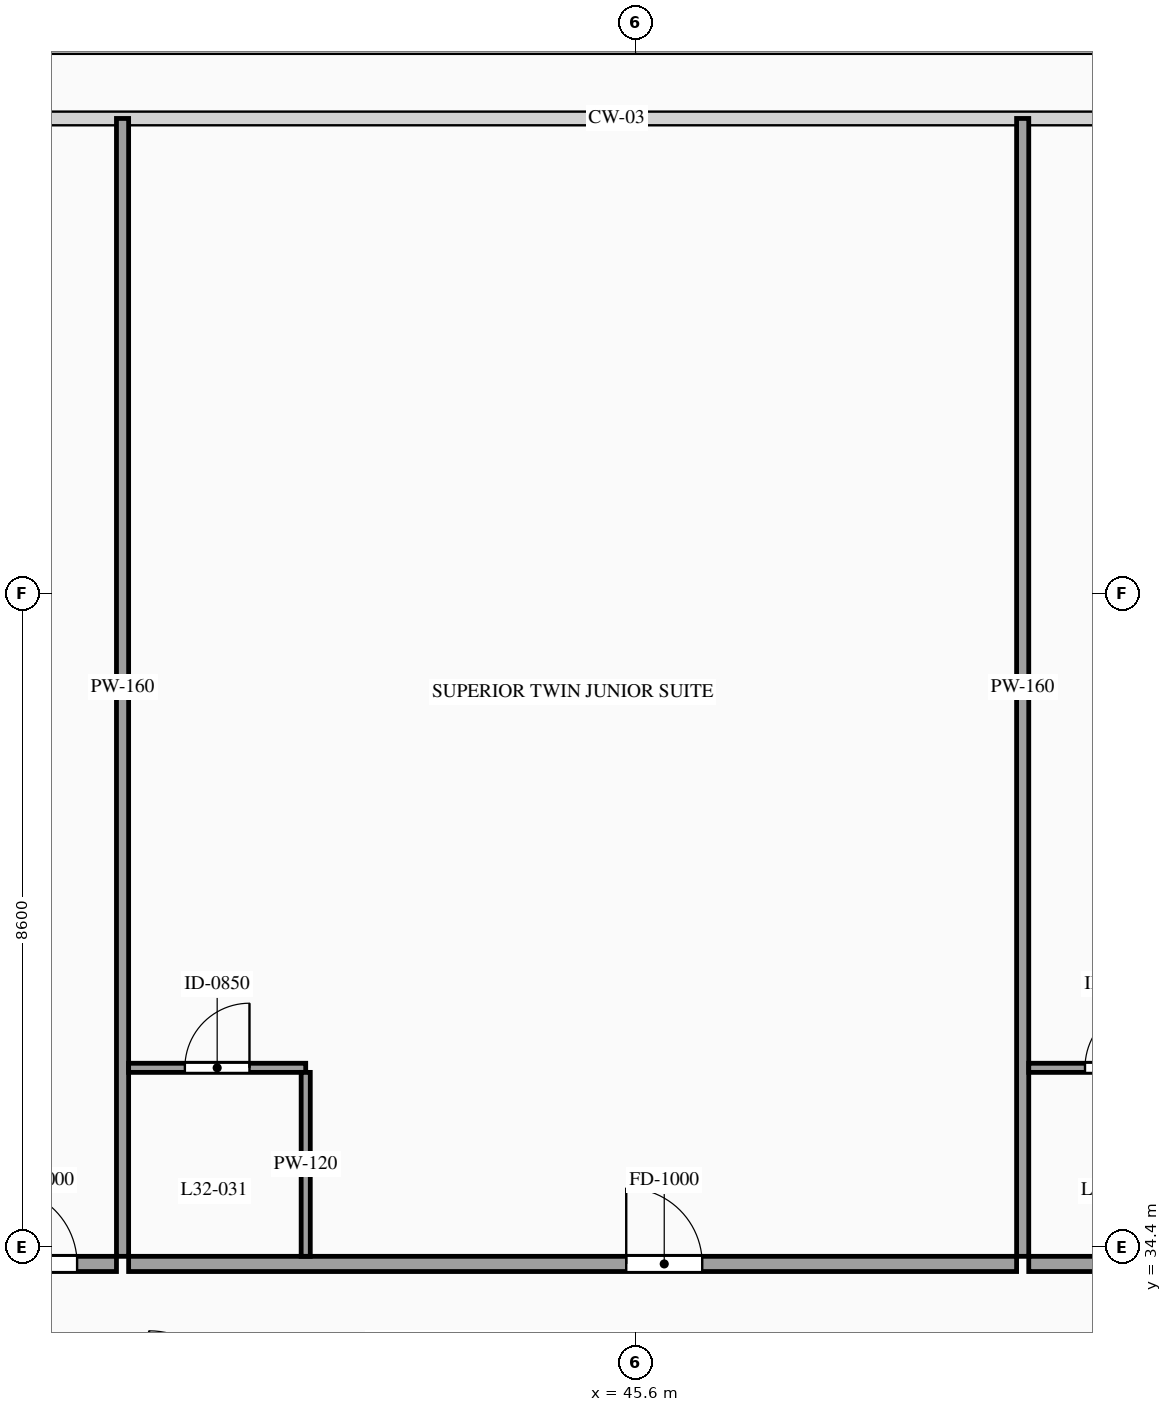
"""IFC4 building model, lengths in metres.
Left out: names, types, materials, properties, quantities, classifications, styles, units other than length and angle.
Written with IfcOpenShell. Run it as: python <this file> out.ifc"""

import sys

from ifc_helpers import new_model, si_unit, direction, frame, frame_2d, origin, place, context, subcontext, project, spatial, rectangle, extrude, source, transform, mapped, element, fill, save


model = new_model("IFC4")
c1 = context("Model", 3, precision=1e-05, world=origin(), true_north=direction((0.0, 1.0)))
c2 = subcontext(c1, "Body", "Model", "MODEL_VIEW")
j1 = project(units=[si_unit("LENGTHUNIT", "METRE"), si_unit("PLANEANGLEUNIT", "RADIAN")], contexts=[c1])
p1 = place(None, origin())
s1 = spatial("IfcSite", under=j1, at=p1, CompositionType="ELEMENT")
p2 = place(p1, origin())
s2 = spatial("IfcBuilding", under=s1, at=p2, CompositionType="ELEMENT")
p3 = place(p2, frame((0.0, 0.0, 122.6)))
s3 = spatial("IfcBuildingStorey", under=s2, at=p3, CompositionType="ELEMENT", Elevation=122.6)
p4 = place(p3, frame((34.325, 34.18, 0.0), z_axis=(0.0, 0.0, 1.0), x_axis=(1.0, 0.0, 0.0)))
e1 = element("IfcWall", 1, at=p4, inside=s3, PredefinedType="PARTITIONING", context=c2, shape_type="SweptSolid", body=[
    extrude(rectangle(XDim=4.445, YDim=0.2, at=frame_2d((2.223, 0.0))), origin(), (0.0, 0.0, 1.0), 3.38),
])
p5 = place(p4, frame((2.927, 0.0, 0.0)))
e2 = element("IfcOpeningElement", 2, at=p5, cuts=e1, PredefinedType="OPENING", context=c2, shape_type="SweptSolid", body=[
    extrude(rectangle(XDim=1.0, YDim=2.2, at=frame_2d((0.5, 1.1))), frame((0.0, 0.115, 0.0), z_axis=(0.0, -1.0, 0.0), x_axis=(1.0, 0.0, 0.0)), (0.0, 0.0, 1.0), 0.23),
])
m1 = source(origin(), c2, "Body", "SweptSolid", [
    extrude(rectangle(XDim=14.97, YDim=0.16, at=frame_2d((7.485, 0.0))), origin(), (0.0, 0.0, 1.0), 3.38),
])
p6 = place(p3, frame((38.85, 34.28, 0.0), z_axis=(0.0, 0.0, 1.0), x_axis=(0.0, 1.0, 0.0)))
e3 = element("IfcWall", 3, at=p6, inside=s3, PredefinedType="PARTITIONING", context=c2, shape_type="MappedRepresentation", body=[
    mapped(m1, transform((0.0, 0.0, 0.0), scale=1.0)),
])
p7 = place(p3, frame((38.93, 34.18, 0.0), z_axis=(0.0, 0.0, 1.0), x_axis=(1.0, 0.0, 0.0)))
e4 = element("IfcWall", 4, at=p7, inside=s3, PredefinedType="PARTITIONING", context=c2, shape_type="SweptSolid", body=[
    extrude(rectangle(XDim=11.683, YDim=0.2, at=frame_2d((5.842, 0.0))), origin(), (0.0, 0.0, 1.0), 3.38),
])
p8 = place(p7, frame((6.547, 0.0, 0.0)))
e5 = element("IfcOpeningElement", 5, at=p8, cuts=e4, PredefinedType="OPENING", context=c2, shape_type="SweptSolid", body=[
    extrude(rectangle(XDim=1.0, YDim=2.2, at=frame_2d((0.5, 1.1))), frame((0.0, 0.115, 0.0), z_axis=(0.0, -1.0, 0.0), x_axis=(1.0, 0.0, 0.0)), (0.0, 0.0, 1.0), 0.23),
])
p9 = place(p3, frame((50.693, 34.28, 0.0), z_axis=(0.0, 0.0, 1.0), x_axis=(0.0, 1.0, 0.0)))
e6 = element("IfcWall", 6, at=p9, inside=s3, PredefinedType="PARTITIONING", context=c2, shape_type="MappedRepresentation", body=[
    mapped(m1, transform((0.0, 0.0, 0.0), scale=1.0)),
])
p10 = place(p3, frame((38.93, 36.76, 0.0), z_axis=(0.0, 0.0, 1.0), x_axis=(1.0, 0.0, 0.0)))
e7 = element("IfcWall", 7, at=p10, inside=s3, PredefinedType="PARTITIONING", context=c2, shape_type="SweptSolid", body=[
    extrude(rectangle(XDim=2.33, YDim=0.12, at=frame_2d((1.165, 0.0))), origin(), (0.0, 0.0, 1.0), 3.38),
])
p11 = place(p10, frame((0.74, 0.0, 0.0)))
e8 = element("IfcOpeningElement", 8, at=p11, cuts=e7, PredefinedType="OPENING", context=c2, shape_type="SweptSolid", body=[
    extrude(rectangle(XDim=0.85, YDim=2.1, at=frame_2d((0.425, 1.05))), frame((0.0, 0.075, 0.0), z_axis=(0.0, -1.0, 0.0), x_axis=(1.0, 0.0, 0.0)), (0.0, 0.0, 1.0), 0.15),
])
m2 = source(origin(), c2, "Body", "SweptSolid", [
    extrude(rectangle(XDim=2.42, YDim=0.12, at=frame_2d((1.21, 0.0))), origin(), (0.0, 0.0, 1.0), 3.38),
])
p12 = place(p3, frame((41.26, 34.28, 0.0), z_axis=(0.0, 0.0, 1.0), x_axis=(0.0, 1.0, 0.0)))
e9 = element("IfcWall", 9, at=p12, inside=s3, PredefinedType="PARTITIONING", context=c2, shape_type="MappedRepresentation", body=[
    mapped(m2, transform((0.0, 0.0, 0.0), scale=1.0)),
])
p13 = place(p3, frame((50.773, 34.18, 0.0), z_axis=(0.0, 0.0, 1.0), x_axis=(1.0, 0.0, 0.0)))
e10 = element("IfcWall", 10, at=p13, inside=s3, PredefinedType="PARTITIONING", context=c2, shape_type="SweptSolid", body=[
    extrude(rectangle(XDim=6.787, YDim=0.2, at=frame_2d((3.394, 0.0))), origin(), (0.0, 0.0, 1.0), 3.38),
])
p14 = place(p13, frame((4.098, 0.0, 0.0)))
e11 = element("IfcOpeningElement", 11, at=p14, cuts=e10, PredefinedType="OPENING", context=c2, shape_type="SweptSolid", body=[
    extrude(rectangle(XDim=1.0, YDim=2.2, at=frame_2d((0.5, 1.1))), frame((0.0, 0.115, 0.0), z_axis=(0.0, -1.0, 0.0), x_axis=(1.0, 0.0, 0.0)), (0.0, 0.0, 1.0), 0.23),
])
p15 = place(p3, frame((50.773, 36.76, 0.0), z_axis=(0.0, 0.0, 1.0), x_axis=(1.0, 0.0, 0.0)))
e12 = element("IfcWall", 12, at=p15, inside=s3, PredefinedType="PARTITIONING", context=c2, shape_type="SweptSolid", body=[
    extrude(rectangle(XDim=2.33, YDim=0.12, at=frame_2d((1.165, 0.0))), origin(), (0.0, 0.0, 1.0), 3.38),
])
p16 = place(p15, frame((0.74, 0.0, 0.0)))
e13 = element("IfcOpeningElement", 13, at=p16, cuts=e12, PredefinedType="OPENING", context=c2, shape_type="SweptSolid", body=[
    extrude(rectangle(XDim=0.85, YDim=2.1, at=frame_2d((0.425, 1.05))), frame((0.0, 0.075, 0.0), z_axis=(0.0, -1.0, 0.0), x_axis=(1.0, 0.0, 0.0)), (0.0, 0.0, 1.0), 0.15),
])
m3 = source(origin(), c2, "Body", "SweptSolid", [
    extrude(rectangle(XDim=1.0, YDim=2.2, at=frame_2d((0.5, 1.1))), frame((0.0, 0.025, 0.0), z_axis=(0.0, -1.0, 0.0), x_axis=(1.0, 0.0, 0.0)), (0.0, 0.0, 1.0), 0.05),
])
p17 = place(p5, origin())
e14 = element("IfcDoor", 14, at=p17, inside=s3, OperationType="SINGLE_SWING_LEFT", PredefinedType="DOOR", context=c2, shape_type="MappedRepresentation", body=[
    mapped(m3, transform((0.0, 0.0, 0.0), scale=1.0)),
])
fill(e2, e14)
p18 = place(p8, origin())
e15 = element("IfcDoor", 15, at=p18, inside=s3, OperationType="SINGLE_SWING_LEFT", PredefinedType="DOOR", context=c2, shape_type="MappedRepresentation", body=[
    mapped(m3, transform((0.0, 0.0, 0.0), scale=1.0)),
])
fill(e5, e15)
m4 = source(origin(), c2, "Body", "SweptSolid", [
    extrude(rectangle(XDim=0.85, YDim=2.1, at=frame_2d((0.425, 1.05))), frame((0.0, 0.025, 0.0), z_axis=(0.0, -1.0, 0.0), x_axis=(1.0, 0.0, 0.0)), (0.0, 0.0, 1.0), 0.05),
])
p19 = place(p11, origin())
e16 = element("IfcDoor", 16, at=p19, inside=s3, OperationType="SINGLE_SWING_RIGHT", PredefinedType="DOOR", context=c2, shape_type="MappedRepresentation", body=[
    mapped(m4, transform((0.0, 0.0, 0.0), scale=1.0)),
])
fill(e8, e16)
p20 = place(p16, origin())
e17 = element("IfcDoor", 17, at=p20, inside=s3, OperationType="SINGLE_SWING_RIGHT", PredefinedType="DOOR", context=c2, shape_type="MappedRepresentation", body=[
    mapped(m4, transform((0.0, 0.0, 0.0), scale=1.0)),
])
fill(e13, e17)
save(model, sys.argv[1])
